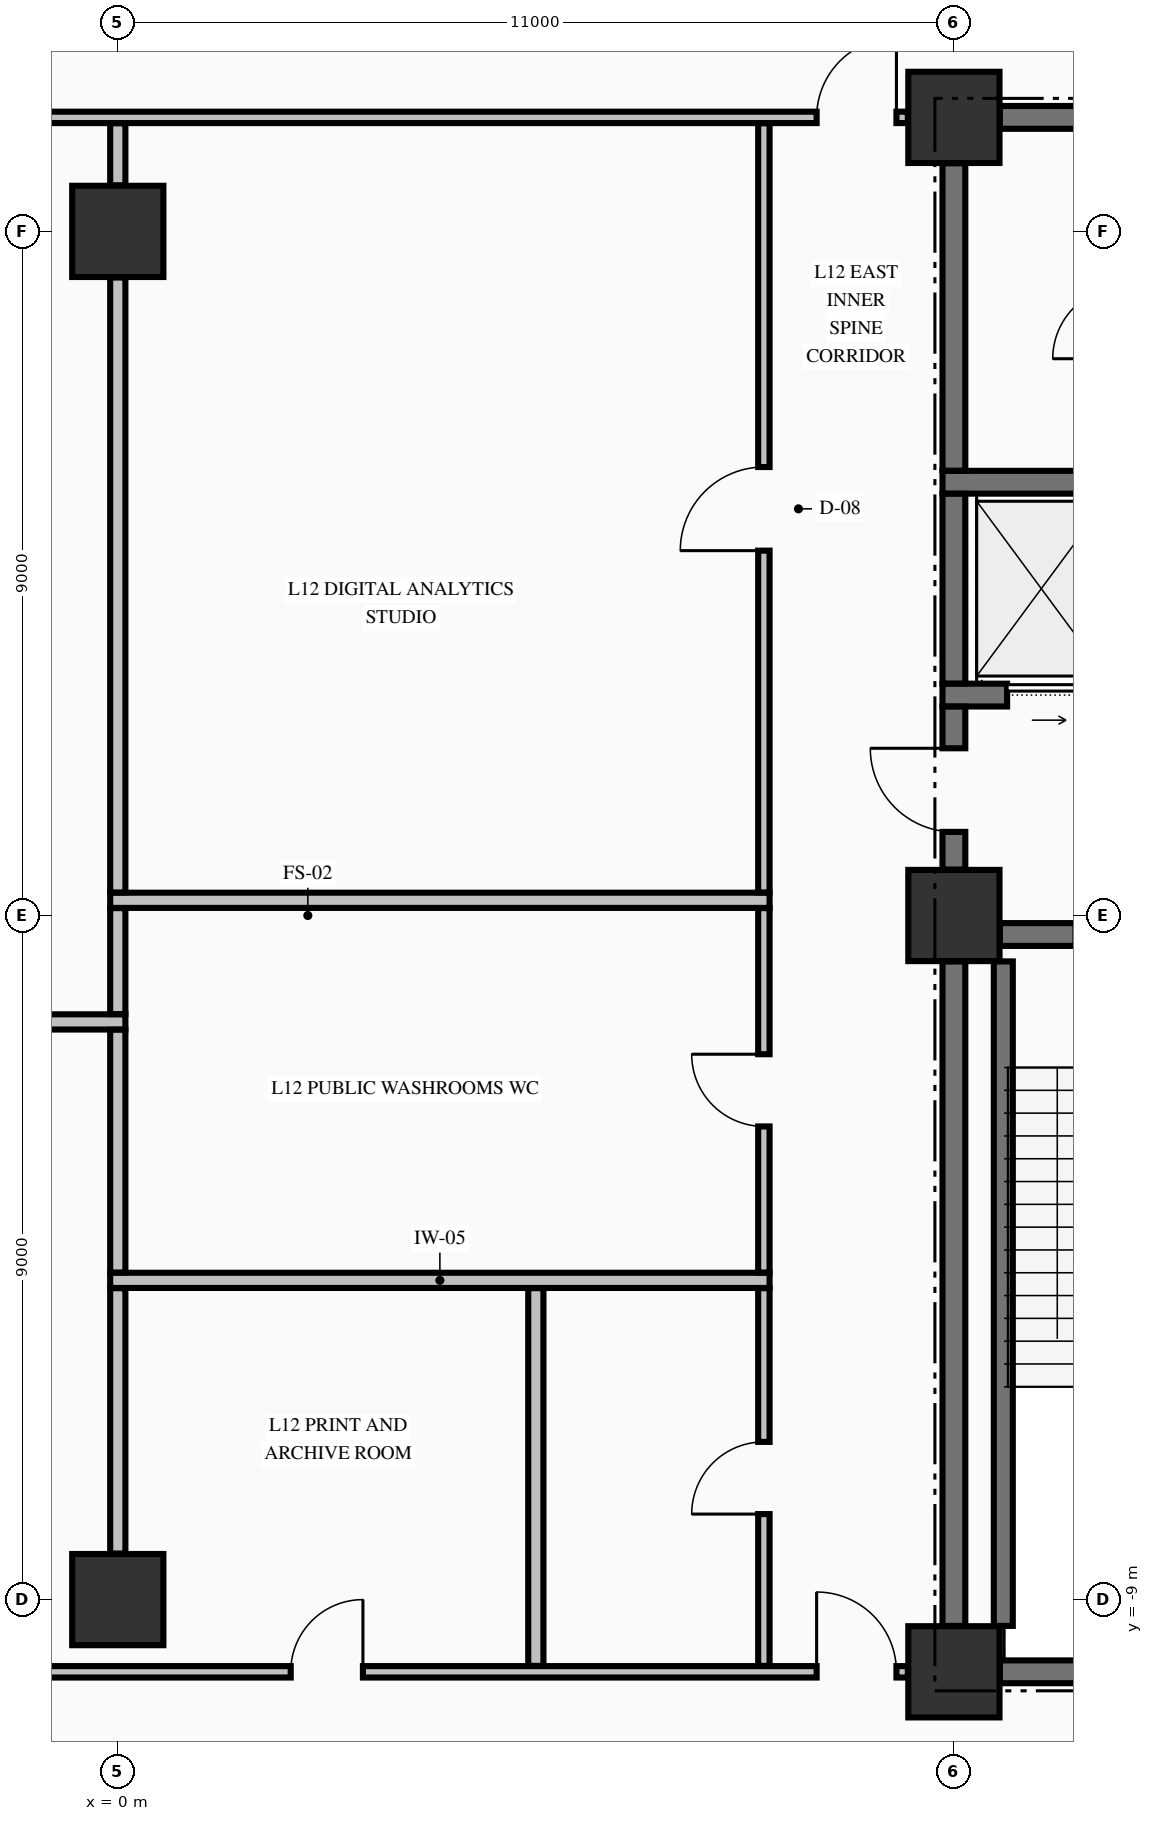
"""IFC4 building model, lengths in metres.
Left out: names, types, materials, properties, quantities, classifications, styles, units other than length and angle.
Written with IfcOpenShell. Run it as: python <this file> out.ifc"""

import sys

from ifc_helpers import new_model, si_unit, direction, frame, frame_2d, origin, origin_2d, place, context, subcontext, project, spatial, rectangle, extrude, element, fill, save


model = new_model("IFC4")
c1 = context("Model", 3, precision=1e-05, world=origin(), true_north=direction((0.0, 1.0)))
c2 = subcontext(c1, "Body", "Model", "MODEL_VIEW")
j1 = project(units=[si_unit("LENGTHUNIT", "METRE"), si_unit("PLANEANGLEUNIT", "RADIAN")], contexts=[c1])
p1 = place(None, origin())
s1 = spatial("IfcSite", under=j1, at=p1, CompositionType="ELEMENT")
p2 = place(p1, origin())
s2 = spatial("IfcBuilding", under=s1, at=p2, CompositionType="ELEMENT")
p3 = place(p2, frame((0.0, 0.0, 52.19)))
s3 = spatial("IfcBuildingStorey", under=s2, at=p3, CompositionType="ELEMENT", Elevation=52.19)
for number, where, z_axis, x_axis in (
    (1, (11.0, -9.95, -0.425), (0.0, 0.0, 1.0), (1.0, 0.0, 0.0)),
    (2, (11.0, 0.0, -0.425), (0.0, 0.0, 1.0), (1.0, 0.0, 0.0)),
    (3, (11.0, 10.5, -0.425), (0.0, 0.0, 1.0), (1.0, 0.0, 0.0)),
    (4, (0.0, -9.0, -0.425), (0.0, 0.0, 1.0), (1.0, 0.0, 0.0)),
    (5, (0.0, 9.0, -0.425), (0.0, 0.0, 1.0), (1.0, 0.0, 0.0)),
):
    element("IfcColumn", number, at=place(p3, frame(where, z_axis=z_axis, x_axis=x_axis)), inside=s3, PredefinedType="COLUMN", context=c2, shape_type="SweptSolid", body=[
        extrude(rectangle(XDim=1.2, YDim=1.2, at=origin_2d()), origin(), (0.0, 0.0, 1.0), 5.0),
    ])
p4 = place(p3, frame((11.604, -9.95, 0.0), z_axis=(0.0, 0.0, 1.0), x_axis=(1.0, 0.0, 0.0)))
e6 = element("IfcWall", 6, at=p4, inside=s3, PredefinedType="SHEAR", context=c2, shape_type="SweptSolid", body=[
    extrude(rectangle(XDim=3.096, YDim=0.3, at=frame_2d((1.548, 0.0))), origin(), (0.0, 0.0, 1.0), 4.575),
])
p5 = place(p3, frame((11.604, -0.25, 0.0), z_axis=(0.0, 0.0, 1.0), x_axis=(1.0, 0.0, 0.0)))
e7 = element("IfcWall", 7, at=p5, inside=s3, PredefinedType="SHEAR", context=c2, shape_type="SweptSolid", body=[
    extrude(rectangle(XDim=3.271, YDim=0.3, at=frame_2d((1.635, 0.0))), origin(), (0.0, 0.0, 1.0), 4.575),
])
p6 = place(p5, frame((0.996, 0.0, 0.0)))
e8 = element("IfcOpeningElement", 8, at=p6, cuts=e7, PredefinedType="OPENING", context=c2, shape_type="SweptSolid", body=[
    extrude(rectangle(XDim=1.1, YDim=2.15, at=frame_2d((0.55, 1.075))), frame((0.0, 0.16, 0.0), z_axis=(0.0, -1.0, 0.0), x_axis=(1.0, 0.0, 0.0)), (0.0, 0.0, 1.0), 0.32),
])
p7 = place(p3, frame((10.85, 2.9, 0.0), z_axis=(0.0, 0.0, 1.0), x_axis=(1.0, 0.0, 0.0)))
e9 = element("IfcWall", 9, at=p7, inside=s3, PredefinedType="SHEAR", context=c2, shape_type="SweptSolid", body=[
    extrude(rectangle(XDim=4.025, YDim=0.3, at=frame_2d((2.012, 0.0))), origin(), (0.0, 0.0, 1.0), 4.575),
])
p8 = place(p7, frame((0.85, 0.0, 0.0)))
e10 = element("IfcOpeningElement", 10, at=p8, cuts=e9, PredefinedType="OPENING", context=c2, shape_type="SweptSolid", body=[
    extrude(rectangle(XDim=1.1, YDim=2.2, at=frame_2d((0.55, 1.1))), frame((0.0, 0.16, 0.0), z_axis=(0.0, -1.0, 0.0), x_axis=(1.0, 0.0, 0.0)), (0.0, 0.0, 1.0), 0.32),
])
p9 = place(p3, frame((10.85, 5.7, 0.0), z_axis=(0.0, 0.0, 1.0), x_axis=(1.0, 0.0, 0.0)))
e11 = element("IfcWall", 11, at=p9, inside=s3, PredefinedType="SHEAR", context=c2, shape_type="SweptSolid", body=[
    extrude(rectangle(XDim=4.025, YDim=0.3, at=frame_2d((2.012, 0.0))), origin(), (0.0, 0.0, 1.0), 4.575),
])
p10 = place(p3, frame((11.604, 10.5, 0.0), z_axis=(0.0, 0.0, 1.0), x_axis=(1.0, 0.0, 0.0)))
e12 = element("IfcWall", 12, at=p10, inside=s3, PredefinedType="SHEAR", context=c2, shape_type="SweptSolid", body=[
    extrude(rectangle(XDim=3.096, YDim=0.3, at=frame_2d((1.548, 0.0))), origin(), (0.0, 0.0, 1.0), 4.575),
])
p11 = place(p10, frame((1.901, 0.0, 0.0)))
e13 = element("IfcOpeningElement", 13, at=p11, cuts=e12, PredefinedType="OPENING", context=c2, shape_type="SweptSolid", body=[
    extrude(rectangle(XDim=0.95, YDim=2.15, at=frame_2d((0.475, 1.075))), frame((0.0, 0.16, 0.0), z_axis=(0.0, -1.0, 0.0), x_axis=(1.0, 0.0, 0.0)), (0.0, 0.0, 1.0), 0.32),
])
p12 = place(p3, frame((-10.394, -9.95, 0.0), z_axis=(0.0, 0.0, 1.0), x_axis=(1.0, 0.0, 0.0)))
e14 = element("IfcWall", 14, at=p12, inside=s3, PredefinedType="PARTITIONING", context=c2, shape_type="SweptSolid", body=[
    extrude(rectangle(XDim=20.788, YDim=0.15, at=frame_2d((10.394, 0.0))), origin(), (0.0, 0.0, 1.0), 4.575),
])
p13 = place(p12, frame((0.15, 0.0, 0.0)))
e15 = element("IfcOpeningElement", 15, at=p13, cuts=e14, PredefinedType="OPENING", context=c2, shape_type="SweptSolid", body=[
    extrude(rectangle(XDim=1.05, YDim=2.15, at=frame_2d((0.525, 1.075))), frame((0.0, 0.085, 0.0), z_axis=(0.0, -1.0, 0.0), x_axis=(1.0, 0.0, 0.0)), (0.0, 0.0, 1.0), 0.17),
])
p14 = place(p12, frame((19.588, 0.0, 0.0)))
e16 = element("IfcOpeningElement", 16, at=p14, cuts=e14, PredefinedType="OPENING", context=c2, shape_type="SweptSolid", body=[
    extrude(rectangle(XDim=1.05, YDim=2.15, at=frame_2d((0.525, 1.075))), frame((0.0, 0.085, 0.0), z_axis=(0.0, -1.0, 0.0), x_axis=(1.0, 0.0, 0.0)), (0.0, 0.0, 1.0), 0.17),
])
p15 = place(p12, frame((12.669, 0.0, 0.0)))
e17 = element("IfcOpeningElement", 17, at=p15, cuts=e14, PredefinedType="OPENING", context=c2, shape_type="SweptSolid", body=[
    extrude(rectangle(XDim=0.95, YDim=2.15, at=frame_2d((0.475, 1.075))), frame((0.0, 0.085, 0.0), z_axis=(0.0, -1.0, 0.0), x_axis=(1.0, 0.0, 0.0)), (0.0, 0.0, 1.0), 0.17),
])
for number, where, z_axis, x_axis in (
    (18, (-0.1, -4.8, 0.0), (0.0, 0.0, 1.0), (1.0, 0.0, 0.0)),
    (19, (-8.575, -1.4, 0.0), (0.0, 0.0, 1.0), (1.0, 0.0, 0.0)),
    (20, (-0.1, 0.2, 0.0), (0.0, 0.0, 1.0), (1.0, 0.0, 0.0)),
):
    element("IfcWall", number, at=place(p3, frame(where, z_axis=z_axis, x_axis=x_axis)), inside=s3, PredefinedType="PARTITIONING", context=c2, shape_type="SweptSolid", body=[
        extrude(rectangle(XDim=8.675, YDim=0.2, at=frame_2d((4.337, 0.0))), origin(), (0.0, 0.0, 1.0), 4.575),
    ])
p16 = place(p3, frame((-10.394, 10.5, 0.0), z_axis=(0.0, 0.0, 1.0), x_axis=(1.0, 0.0, 0.0)))
e21 = element("IfcWall", 21, at=p16, inside=s3, PredefinedType="PARTITIONING", context=c2, shape_type="SweptSolid", body=[
    extrude(rectangle(XDim=20.788, YDim=0.15, at=frame_2d((10.394, 0.0))), origin(), (0.0, 0.0, 1.0), 4.575),
])
p17 = place(p16, frame((0.15, 0.0, 0.0)))
e22 = element("IfcOpeningElement", 22, at=p17, cuts=e21, PredefinedType="OPENING", context=c2, shape_type="SweptSolid", body=[
    extrude(rectangle(XDim=1.05, YDim=2.15, at=frame_2d((0.525, 1.075))), frame((0.0, 0.085, 0.0), z_axis=(0.0, -1.0, 0.0), x_axis=(1.0, 0.0, 0.0)), (0.0, 0.0, 1.0), 0.17),
])
p18 = place(p16, frame((19.588, 0.0, 0.0)))
e23 = element("IfcOpeningElement", 23, at=p18, cuts=e21, PredefinedType="OPENING", context=c2, shape_type="SweptSolid", body=[
    extrude(rectangle(XDim=1.05, YDim=2.15, at=frame_2d((0.525, 1.075))), frame((0.0, 0.085, 0.0), z_axis=(0.0, -1.0, 0.0), x_axis=(1.0, 0.0, 0.0)), (0.0, 0.0, 1.0), 0.17),
])
p19 = place(p3, frame((11.0, -9.346, 0.0), z_axis=(0.0, 0.0, 1.0), x_axis=(0.0, 1.0, 0.0)))
e24 = element("IfcWall", 24, at=p19, inside=s3, PredefinedType="SHEAR", context=c2, shape_type="SweptSolid", body=[
    extrude(rectangle(XDim=8.742, YDim=0.3, at=frame_2d((4.371, 0.0))), origin(), (0.0, 0.0, 1.0), 4.575),
])
p20 = place(p3, frame((11.0, 0.604, 0.0), z_axis=(0.0, 0.0, 1.0), x_axis=(0.0, 1.0, 0.0)))
e25 = element("IfcWall", 25, at=p20, inside=s3, PredefinedType="SHEAR", context=c2, shape_type="SweptSolid", body=[
    extrude(rectangle(XDim=2.144, YDim=0.3, at=frame_2d((1.072, 0.0))), origin(), (0.0, 0.0, 1.0), 4.575),
])
p21 = place(p20, frame((0.496, 0.0, 0.0)))
e26 = element("IfcOpeningElement", 26, at=p21, cuts=e25, PredefinedType="OPENING", context=c2, shape_type="SweptSolid", body=[
    extrude(rectangle(XDim=1.1, YDim=2.15, at=frame_2d((0.55, 1.075))), frame((0.0, 0.16, 0.0), z_axis=(0.0, -1.0, 0.0), x_axis=(1.0, 0.0, 0.0)), (0.0, 0.0, 1.0), 0.32),
])
p22 = place(p3, frame((11.0, 3.052, 0.0), z_axis=(0.0, 0.0, 1.0), x_axis=(0.0, 1.0, 0.0)))
e27 = element("IfcWall", 27, at=p22, inside=s3, PredefinedType="SHEAR", context=c2, shape_type="SweptSolid", body=[
    extrude(rectangle(XDim=2.496, YDim=0.3, at=frame_2d((1.248, 0.0))), origin(), (0.0, 0.0, 1.0), 4.575),
])
p23 = place(p3, frame((11.0, 5.852, 0.0), z_axis=(0.0, 0.0, 1.0), x_axis=(0.0, 1.0, 0.0)))
e28 = element("IfcWall", 28, at=p23, inside=s3, PredefinedType="SHEAR", context=c2, shape_type="SweptSolid", body=[
    extrude(rectangle(XDim=4.044, YDim=0.3, at=frame_2d((2.022, 0.0))), origin(), (0.0, 0.0, 1.0), 4.575),
])
p24 = place(p3, frame((11.65, -9.346, 0.0), z_axis=(0.0, 0.0, 1.0), x_axis=(0.0, 1.0, 0.0)))
e29 = element("IfcWall", 29, at=p24, inside=s3, PredefinedType="SOLIDWALL", context=c2, shape_type="SweptSolid", body=[
    extrude(rectangle(XDim=8.742, YDim=0.25, at=frame_2d((4.371, 0.0))), origin(), (0.0, 0.0, 1.0), 4.575),
])
p25 = place(p3, frame((0.0, -8.394, 0.0), z_axis=(0.0, 0.0, 1.0), x_axis=(0.0, 1.0, 0.0)))
e30 = element("IfcWall", 30, at=p25, inside=s3, PredefinedType="PARTITIONING", context=c2, shape_type="SweptSolid", body=[
    extrude(rectangle(XDim=3.491, YDim=0.2, at=frame_2d((1.746, 0.0))), origin(), (0.0, 0.0, 1.0), 3.915),
])
p26 = place(p3, frame((0.0, -4.697, 0.0), z_axis=(0.0, 0.0, 1.0), x_axis=(0.0, 1.0, 0.0)))
e31 = element("IfcWall", 31, at=p26, inside=s3, PredefinedType="PARTITIONING", context=c2, shape_type="SweptSolid", body=[
    extrude(rectangle(XDim=3.194, YDim=0.2, at=frame_2d((1.597, 0.0))), origin(), (0.0, 0.0, 1.0), 3.915),
])
p27 = place(p3, frame((0.0, -1.297, 0.0), z_axis=(0.0, 0.0, 1.0), x_axis=(0.0, 1.0, 0.0)))
e32 = element("IfcWall", 32, at=p27, inside=s3, PredefinedType="PARTITIONING", context=c2, shape_type="SweptSolid", body=[
    extrude(rectangle(XDim=1.394, YDim=0.2, at=frame_2d((0.697, 0.0))), origin(), (0.0, 0.0, 1.0), 3.915),
])
p28 = place(p3, frame((0.0, 0.303, 0.0), z_axis=(0.0, 0.0, 1.0), x_axis=(0.0, 1.0, 0.0)))
e33 = element("IfcWall", 33, at=p28, inside=s3, PredefinedType="PARTITIONING", context=c2, shape_type="SweptSolid", body=[
    extrude(rectangle(XDim=8.091, YDim=0.2, at=frame_2d((4.045, 0.0))), origin(), (0.0, 0.0, 1.0), 3.915),
])
p29 = place(p3, frame((0.0, 9.606, 0.0), z_axis=(0.0, 0.0, 1.0), x_axis=(0.0, 1.0, 0.0)))
e34 = element("IfcWall", 34, at=p29, inside=s3, PredefinedType="PARTITIONING", context=c2, shape_type="SweptSolid", body=[
    extrude(rectangle(XDim=0.816, YDim=0.2, at=frame_2d((0.408, 0.0))), origin(), (0.0, 0.0, 1.0), 2.167),
])
p30 = place(p3, frame((5.5, -9.872, 0.0), z_axis=(0.0, 0.0, 1.0), x_axis=(0.0, 1.0, 0.0)))
e35 = element("IfcWall", 35, at=p30, inside=s3, PredefinedType="PARTITIONING", context=c2, shape_type="SweptSolid", body=[
    extrude(rectangle(XDim=4.969, YDim=0.2, at=frame_2d((2.484, 0.0))), origin(), (0.0, 0.0, 1.0), 4.575),
])
p31 = place(p3, frame((8.5, -9.872, 0.0), z_axis=(0.0, 0.0, 1.0), x_axis=(0.0, 1.0, 0.0)))
e36 = element("IfcWall", 36, at=p31, inside=s3, PredefinedType="PARTITIONING", context=c2, shape_type="SweptSolid", body=[
    extrude(rectangle(XDim=4.969, YDim=0.15, at=frame_2d((2.484, 0.0))), origin(), (0.0, 0.0, 1.0), 4.575),
])
p32 = place(p31, frame((1.997, 0.0, 0.0)))
e37 = element("IfcOpeningElement", 37, at=p32, cuts=e36, PredefinedType="OPENING", context=c2, shape_type="SweptSolid", body=[
    extrude(rectangle(XDim=0.95, YDim=2.15, at=frame_2d((0.475, 1.075))), frame((0.0, 0.085, 0.0), z_axis=(0.0, -1.0, 0.0), x_axis=(1.0, 0.0, 0.0)), (0.0, 0.0, 1.0), 0.17),
])
p33 = place(p3, frame((8.5, -4.697, 0.0), z_axis=(0.0, 0.0, 1.0), x_axis=(0.0, 1.0, 0.0)))
e38 = element("IfcWall", 38, at=p33, inside=s3, PredefinedType="PARTITIONING", context=c2, shape_type="SweptSolid", body=[
    extrude(rectangle(XDim=4.794, YDim=0.15, at=frame_2d((2.397, 0.0))), origin(), (0.0, 0.0, 1.0), 4.575),
])
p34 = place(p33, frame((1.922, 0.0, 0.0)))
e39 = element("IfcOpeningElement", 39, at=p34, cuts=e38, PredefinedType="OPENING", context=c2, shape_type="SweptSolid", body=[
    extrude(rectangle(XDim=0.95, YDim=2.15, at=frame_2d((0.475, 1.075))), frame((0.0, 0.085, 0.0), z_axis=(0.0, -1.0, 0.0), x_axis=(1.0, 0.0, 0.0)), (0.0, 0.0, 1.0), 0.17),
])
p35 = place(p3, frame((8.5, 0.303, 0.0), z_axis=(0.0, 0.0, 1.0), x_axis=(0.0, 1.0, 0.0)))
e40 = element("IfcWall", 40, at=p35, inside=s3, PredefinedType="PARTITIONING", context=c2, shape_type="SweptSolid", body=[
    extrude(rectangle(XDim=10.119, YDim=0.15, at=frame_2d((5.06, 0.0))), origin(), (0.0, 0.0, 1.0), 4.575),
])
p36 = place(p35, frame((4.497, 0.0, 0.0)))
e41 = element("IfcOpeningElement", 41, at=p36, cuts=e40, PredefinedType="OPENING", context=c2, shape_type="SweptSolid", body=[
    extrude(rectangle(XDim=1.1, YDim=2.15, at=frame_2d((0.55, 1.075))), frame((0.0, 0.085, 0.0), z_axis=(0.0, -1.0, 0.0), x_axis=(1.0, 0.0, 0.0)), (0.0, 0.0, 1.0), 0.17),
])
p37 = place(p21, origin())
e42 = element("IfcDoor", 42, at=p37, inside=s3, OperationType="SINGLE_SWING_RIGHT", PredefinedType="DOOR", context=c2, shape_type="SweptSolid", body=[
    extrude(rectangle(XDim=1.1, YDim=2.15, at=frame_2d((0.55, 1.075))), frame((0.0, 0.025, 0.0), z_axis=(0.0, -1.0, 0.0), x_axis=(1.0, 0.0, 0.0)), (0.0, 0.0, 1.0), 0.05),
])
fill(e26, e42)
p38 = place(p8, origin())
e43 = element("IfcDoor", 43, at=p38, inside=s3, OperationType="SLIDING_TO_RIGHT", PredefinedType="DOOR", context=c2, shape_type="SweptSolid", body=[
    extrude(rectangle(XDim=1.1, YDim=2.2, at=frame_2d((0.55, 1.1))), frame((0.0, 0.025, 0.0), z_axis=(0.0, -1.0, 0.0), x_axis=(1.0, 0.0, 0.0)), (0.0, 0.0, 1.0), 0.05),
])
fill(e10, e43)
p39 = place(p18, origin())
e44 = element("IfcDoor", 44, at=p39, inside=s3, OperationType="SINGLE_SWING_RIGHT", PredefinedType="DOOR", context=c2, shape_type="SweptSolid", body=[
    extrude(rectangle(XDim=1.05, YDim=2.15, at=frame_2d((0.525, 1.075))), frame((0.0, 0.025, 0.0), z_axis=(0.0, -1.0, 0.0), x_axis=(1.0, 0.0, 0.0)), (0.0, 0.0, 1.0), 0.05),
])
fill(e23, e44)
p40 = place(p14, origin())
e45 = element("IfcDoor", 45, at=p40, inside=s3, OperationType="SINGLE_SWING_LEFT", PredefinedType="DOOR", context=c2, shape_type="SweptSolid", body=[
    extrude(rectangle(XDim=1.05, YDim=2.15, at=frame_2d((0.525, 1.075))), frame((0.0, 0.025, 0.0), z_axis=(0.0, -1.0, 0.0), x_axis=(1.0, 0.0, 0.0)), (0.0, 0.0, 1.0), 0.05),
])
fill(e16, e45)
p41 = place(p36, origin())
e46 = element("IfcDoor", 46, at=p41, inside=s3, OperationType="SINGLE_SWING_LEFT", PredefinedType="DOOR", context=c2, shape_type="SweptSolid", body=[
    extrude(rectangle(XDim=1.1, YDim=2.15, at=frame_2d((0.55, 1.075))), frame((0.0, 0.025, 0.0), z_axis=(0.0, -1.0, 0.0), x_axis=(1.0, 0.0, 0.0)), (0.0, 0.0, 1.0), 0.05),
])
fill(e41, e46)
p42 = place(p34, origin())
e47 = element("IfcDoor", 47, at=p42, inside=s3, OperationType="SINGLE_SWING_RIGHT", PredefinedType="DOOR", context=c2, shape_type="SweptSolid", body=[
    extrude(rectangle(XDim=0.95, YDim=2.15, at=frame_2d((0.475, 1.075))), frame((0.0, 0.025, 0.0), z_axis=(0.0, -1.0, 0.0), x_axis=(1.0, 0.0, 0.0)), (0.0, 0.0, 1.0), 0.05),
])
fill(e39, e47)
p43 = place(p32, origin())
e48 = element("IfcDoor", 48, at=p43, inside=s3, OperationType="SINGLE_SWING_LEFT", PredefinedType="DOOR", context=c2, shape_type="SweptSolid", body=[
    extrude(rectangle(XDim=0.95, YDim=2.15, at=frame_2d((0.475, 1.075))), frame((0.0, 0.025, 0.0), z_axis=(0.0, -1.0, 0.0), x_axis=(1.0, 0.0, 0.0)), (0.0, 0.0, 1.0), 0.05),
])
fill(e37, e48)
p44 = place(p15, origin())
e49 = element("IfcDoor", 49, at=p44, inside=s3, OperationType="SINGLE_SWING_RIGHT", PredefinedType="DOOR", context=c2, shape_type="SweptSolid", body=[
    extrude(rectangle(XDim=0.95, YDim=2.15, at=frame_2d((0.475, 1.075))), frame((0.0, 0.025, 0.0), z_axis=(0.0, -1.0, 0.0), x_axis=(1.0, 0.0, 0.0)), (0.0, 0.0, 1.0), 0.05),
])
fill(e17, e49)
save(model, sys.argv[1])
